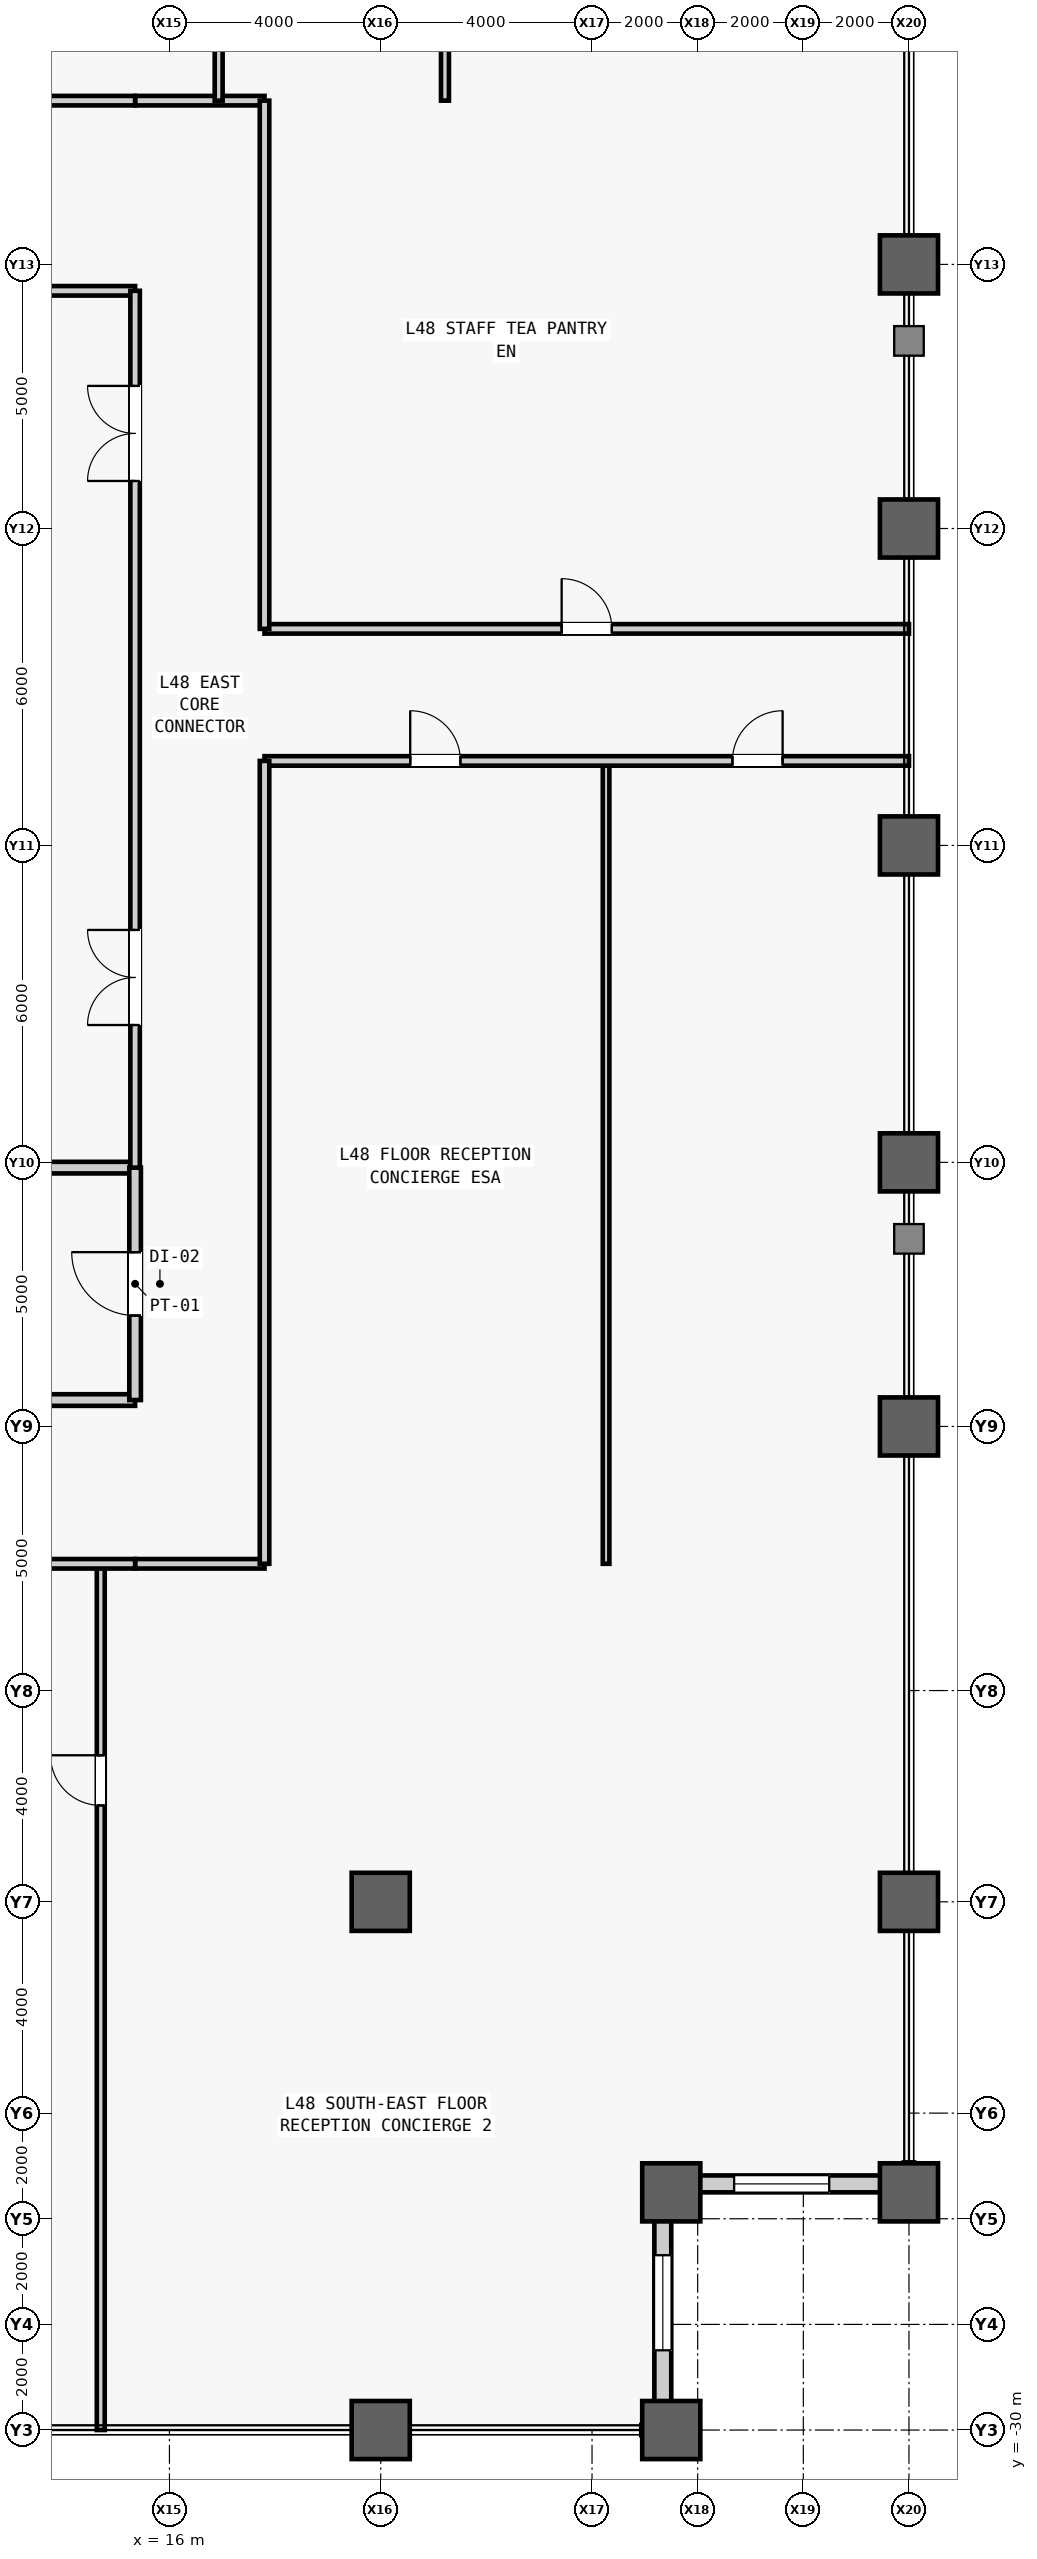
"""IFC4 building model, lengths in metres.
Left out: names, types, materials, properties, quantities, classifications, styles, units other than length and angle.
Written with IfcOpenShell. Run it as: python <this file> out.ifc"""

import sys

from ifc_helpers import new_model, si_unit, direction, frame, frame_2d, origin, origin_2d, place, context, subcontext, project, spatial, rectangle, hollow_rectangle, extrude, source, transform, mapped, element, fill, save


model = new_model("IFC4")
c1 = context("Model", 3, precision=1e-05, world=origin(), true_north=direction((0.0, 1.0)))
c2 = subcontext(c1, "Body", "Model", "MODEL_VIEW")
j1 = project(units=[si_unit("LENGTHUNIT", "METRE"), si_unit("PLANEANGLEUNIT", "RADIAN")], contexts=[c1])
p1 = place(None, origin())
s1 = spatial("IfcSite", under=j1, at=p1, CompositionType="ELEMENT")
p2 = place(p1, origin())
s2 = spatial("IfcBuilding", under=s1, at=p2, CompositionType="ELEMENT")
p3 = place(p2, frame((0.0, 0.0, 207.1)))
s3 = spatial("IfcBuildingStorey", under=s2, at=p3, CompositionType="ELEMENT", Elevation=207.1)
m1 = source(origin(), c2, "Body", "SweptSolid", [
    extrude(hollow_rectangle(XDim=1.1, YDim=1.1, WallThickness=0.06, at=origin_2d()), origin(), (0.0, 0.0, 1.0), 4.0),
])
for number, where, z_axis, x_axis in (
    (1, (20.0, -30.0, 0.0), (0.0, 0.0, 1.0), (1.0, 0.0, 0.0)),
    (2, (20.0, -20.0, 0.0), (0.0, 0.0, 1.0), (1.0, 0.0, 0.0)),
    (3, (25.5, -30.0, 0.0), (0.0, 0.0, 1.0), (1.0, 0.0, 0.0)),
    (4, (25.5, -25.5, 0.0), (0.0, 0.0, 1.0), (1.0, 0.0, 0.0)),
    (5, (30.0, -25.5, 0.0), (0.0, 0.0, 1.0), (1.0, 0.0, 0.0)),
    (6, (30.0, -20.0, 0.0), (0.0, 0.0, 1.0), (1.0, 0.0, 0.0)),
    (7, (30.0, -11.0, 0.0), (0.0, 0.0, 1.0), (1.0, 0.0, 0.0)),
    (8, (30.0, -6.0, 0.0), (0.0, 0.0, 1.0), (1.0, 0.0, 0.0)),
    (9, (30.0, 0.0, 0.0), (0.0, 0.0, 1.0), (1.0, 0.0, 0.0)),
    (10, (30.0, 6.0, 0.0), (0.0, 0.0, 1.0), (1.0, 0.0, 0.0)),
    (11, (30.0, 11.0, 0.0), (0.0, 0.0, 1.0), (1.0, 0.0, 0.0)),
):
    element("IfcColumn", number, at=place(p3, frame(where, z_axis=z_axis, x_axis=x_axis)), inside=s3, PredefinedType="COLUMN", context=c2, shape_type="MappedRepresentation", body=[
        mapped(m1, transform((0.0, 0.0, 0.0), scale=1.0)),
    ])
m2 = source(origin(), c2, "Body", "SweptSolid", [
    extrude(rectangle(XDim=4.18, YDim=0.32, at=frame_2d((2.09, 0.0))), origin(), (0.0, 0.0, 1.0), 2.38),
])
p4 = place(p3, frame((25.34, -29.68, 0.0), z_axis=(0.0, 0.0, 1.0), x_axis=(0.0, 1.0, 0.0)))
e12 = element("IfcWall", 12, at=p4, inside=s3, PredefinedType="STANDARD", context=c2, shape_type="MappedRepresentation", body=[
    mapped(m2, transform((0.0, 0.0, 0.0), scale=1.0)),
])
m3 = source(origin(), c2, "Body", "SweptSolid", [
    extrude(rectangle(XDim=1.8, YDim=1.66, at=frame_2d((0.9, 0.83))), frame((0.0, 0.17, 0.0), z_axis=(0.0, -1.0, 0.0), x_axis=(1.0, 0.0, 0.0)), (0.0, 0.0, 1.0), 0.34),
])
p5 = place(p4, frame((1.19, 0.0, 0.5)))
e13 = element("IfcOpeningElement", 13, at=p5, cuts=e12, PredefinedType="OPENING", context=c2, shape_type="MappedRepresentation", body=[
    mapped(m3, transform((0.0, 0.0, 0.0), scale=1.0)),
])
m4 = source(origin(), c2, "Body", "SweptSolid", [
    extrude(rectangle(XDim=4.18, YDim=0.32, at=frame_2d((2.09, 0.0))), origin(), (0.0, 0.0, 1.0), 3.164),
])
p6 = place(p3, frame((25.5, -25.34, 0.0), z_axis=(0.0, 0.0, 1.0), x_axis=(1.0, 0.0, 0.0)))
e14 = element("IfcWall", 14, at=p6, inside=s3, PredefinedType="STANDARD", context=c2, shape_type="MappedRepresentation", body=[
    mapped(m4, transform((0.0, 0.0, 0.0), scale=1.0)),
])
m5 = source(origin(), c2, "Body", "SweptSolid", [
    extrude(rectangle(XDim=1.8, YDim=2.4, at=frame_2d((0.9, 1.2))), frame((0.0, 0.17, 0.0), z_axis=(0.0, -1.0, 0.0), x_axis=(1.0, 0.0, 0.0)), (0.0, 0.0, 1.0), 0.34),
])
p7 = place(p6, frame((1.19, 0.0, 0.5)))
e15 = element("IfcOpeningElement", 15, at=p7, cuts=e14, PredefinedType="OPENING", context=c2, shape_type="MappedRepresentation", body=[
    mapped(m5, transform((0.0, 0.0, 0.0), scale=1.0)),
])
m6 = source(origin(), c2, "Body", "SweptSolid", [
    extrude(rectangle(XDim=4.05, YDim=0.22, at=frame_2d((2.025, 0.0))), origin(), (0.0, 0.0, 1.0), 3.78),
])
p8 = place(p3, frame((11.3, -10.5, 0.0), z_axis=(0.0, 0.0, 1.0), x_axis=(1.0, 0.0, 0.0)))
e16 = element("IfcWall", 16, at=p8, inside=s3, PredefinedType="PARTITIONING", context=c2, shape_type="MappedRepresentation", body=[
    mapped(m6, transform((0.0, 0.0, 0.0), scale=1.0)),
])
m7 = source(origin(), c2, "Body", "SweptSolid", [
    extrude(rectangle(XDim=4.05, YDim=0.22, at=frame_2d((2.025, 0.0))), origin(), (0.0, 0.0, 1.0), 2.38),
])
p9 = place(p3, frame((11.3, -6.1, 0.0), z_axis=(0.0, 0.0, 1.0), x_axis=(1.0, 0.0, 0.0)))
e17 = element("IfcWall", 17, at=p9, inside=s3, PredefinedType="PARTITIONING", context=c2, shape_type="MappedRepresentation", body=[
    mapped(m7, transform((0.0, 0.0, 0.0), scale=1.0)),
])
m8 = source(origin(), c2, "Body", "SweptSolid", [
    extrude(rectangle(XDim=4.4, YDim=0.22, at=frame_2d((2.2, 0.0))), origin(), (0.0, 0.0, 1.0), 3.78),
])
p10 = place(p3, frame((15.35, -10.5, 0.0), z_axis=(0.0, 0.0, 1.0), x_axis=(0.0, 1.0, 0.0)))
e18 = element("IfcWall", 18, at=p10, inside=s3, PredefinedType="PARTITIONING", context=c2, shape_type="MappedRepresentation", body=[
    mapped(m8, transform((0.0, 0.0, 0.0), scale=1.0)),
])
m9 = source(origin(), c2, "Body", "SweptSolid", [
    extrude(rectangle(XDim=1.2, YDim=2.2, at=frame_2d((0.6, 1.1))), frame((0.0, 0.12, 0.0), z_axis=(0.0, -1.0, 0.0), x_axis=(1.0, 0.0, 0.0)), (0.0, 0.0, 1.0), 0.24),
])
p11 = place(p10, frame((1.6, 0.0, 0.0)))
e19 = element("IfcOpeningElement", 19, at=p11, cuts=e18, PredefinedType="OPENING", context=c2, shape_type="MappedRepresentation", body=[
    mapped(m9, transform((0.0, 0.0, 0.0), scale=1.0)),
])
m10 = source(origin(), c2, "Body", "SweptSolid", [
    extrude(rectangle(XDim=4.05, YDim=0.18, at=frame_2d((2.025, 0.0))), origin(), (0.0, 0.0, 1.0), 3.78),
])
p12 = place(p3, frame((11.3, 10.5, 0.0), z_axis=(0.0, 0.0, 1.0), x_axis=(1.0, 0.0, 0.0)))
e20 = element("IfcWall", 20, at=p12, inside=s3, PredefinedType="PARTITIONING", context=c2, shape_type="MappedRepresentation", body=[
    mapped(m10, transform((0.0, 0.0, 0.0), scale=1.0)),
])
m11 = source(origin(), c2, "Body", "SweptSolid", [
    extrude(rectangle(XDim=16.6, YDim=0.18, at=frame_2d((8.3, 0.0))), origin(), (0.0, 0.0, 1.0), 3.78),
])
p13 = place(p3, frame((15.35, -6.1, 0.0), z_axis=(0.0, 0.0, 1.0), x_axis=(0.0, 1.0, 0.0)))
e21 = element("IfcWall", 21, at=p13, inside=s3, PredefinedType="PARTITIONING", context=c2, shape_type="MappedRepresentation", body=[
    mapped(m11, transform((0.0, 0.0, 0.0), scale=1.0)),
])
m12 = source(origin(), c2, "Body", "SweptSolid", [
    extrude(rectangle(XDim=1.8, YDim=2.25, at=frame_2d((0.9, 1.125))), frame((0.0, 0.1, 0.0), z_axis=(0.0, -1.0, 0.0), x_axis=(1.0, 0.0, 0.0)), (0.0, 0.0, 1.0), 0.2),
])
p14 = place(p13, frame((2.7, 0.0, 0.0)))
e22 = element("IfcOpeningElement", 22, at=p14, cuts=e21, PredefinedType="OPENING", context=c2, shape_type="MappedRepresentation", body=[
    mapped(m12, transform((0.0, 0.0, 0.0), scale=1.0)),
])
p15 = place(p13, frame((13.0, 0.0, 0.0)))
e23 = element("IfcOpeningElement", 23, at=p15, cuts=e21, PredefinedType="OPENING", context=c2, shape_type="MappedRepresentation", body=[
    mapped(m12, transform((0.0, 0.0, 0.0), scale=1.0)),
])
m13 = source(origin(), c2, "Body", "SweptSolid", [
    extrude(rectangle(XDim=2.45, YDim=0.18, at=frame_2d((1.225, 0.0))), origin(), (0.0, 0.0, 1.0), 3.78),
])
for number, where, z_axis, x_axis in (
    (24, (15.35, -13.6, 0.0), (0.0, 0.0, 1.0), (1.0, 0.0, 0.0)),
    (25, (15.35, 14.1, 0.0), (0.0, 0.0, 1.0), (1.0, 0.0, 0.0)),
):
    element("IfcWall", number, at=place(p3, frame(where, z_axis=z_axis, x_axis=x_axis)), inside=s3, PredefinedType="PARTITIONING", context=c2, shape_type="MappedRepresentation", body=[
        mapped(m13, transform((0.0, 0.0, 0.0), scale=1.0)),
    ])
m14 = source(origin(), c2, "Body", "SweptSolid", [
    extrude(rectangle(XDim=16.4, YDim=0.15, at=frame_2d((8.2, 0.0))), origin(), (0.0, 0.0, 1.0), 3.78),
])
p16 = place(p3, frame((14.7, -30.0, 0.0), z_axis=(0.0, 0.0, 1.0), x_axis=(0.0, 1.0, 0.0)))
e26 = element("IfcWall", 26, at=p16, inside=s3, PredefinedType="PARTITIONING", context=c2, shape_type="MappedRepresentation", body=[
    mapped(m14, transform((0.0, 0.0, 0.0), scale=1.0)),
])
m15 = source(origin(), c2, "Body", "SweptSolid", [
    extrude(rectangle(XDim=0.95, YDim=2.15, at=frame_2d((0.475, 1.075))), frame((0.0, 0.085, 0.0), z_axis=(0.0, -1.0, 0.0), x_axis=(1.0, 0.0, 0.0)), (0.0, 0.0, 1.0), 0.17),
])
p17 = place(p16, frame((11.825, 0.0, 0.0)))
e27 = element("IfcOpeningElement", 27, at=p17, cuts=e26, PredefinedType="OPENING", context=c2, shape_type="MappedRepresentation", body=[
    mapped(m15, transform((0.0, 0.0, 0.0), scale=1.0)),
])
m16 = source(origin(), c2, "Body", "SweptSolid", [
    extrude(rectangle(XDim=11.45, YDim=0.18, at=frame_2d((5.725, 0.0))), origin(), (0.0, 0.0, 1.0), 3.78),
])
p18 = place(p3, frame((3.9, -13.6, 0.0), z_axis=(0.0, 0.0, 1.0), x_axis=(1.0, 0.0, 0.0)))
e28 = element("IfcWall", 28, at=p18, inside=s3, PredefinedType="PARTITIONING", context=c2, shape_type="MappedRepresentation", body=[
    mapped(m16, transform((0.0, 0.0, 0.0), scale=1.0)),
])
m17 = source(origin(), c2, "Body", "SweptSolid", [
    extrude(rectangle(XDim=15.9, YDim=0.15, at=frame_2d((7.95, 0.0))), origin(), (0.0, 0.0, 1.0), 3.78),
])
p19 = place(p3, frame((16.932, 14.1, 0.0), z_axis=(0.0, 0.0, 1.0), x_axis=(0.0, 1.0, 0.0)))
e29 = element("IfcWall", 29, at=p19, inside=s3, PredefinedType="PARTITIONING", context=c2, shape_type="MappedRepresentation", body=[
    mapped(m17, transform((0.0, 0.0, 0.0), scale=1.0)),
])
p20 = place(p19, frame((11.45, 0.0, 0.0)))
e30 = element("IfcOpeningElement", 30, at=p20, cuts=e29, PredefinedType="OPENING", context=c2, shape_type="MappedRepresentation", body=[
    mapped(m15, transform((0.0, 0.0, 0.0), scale=1.0)),
])
p21 = place(p3, frame((21.216, 14.1, 0.0), z_axis=(0.0, 0.0, 1.0), x_axis=(0.0, 1.0, 0.0)))
e31 = element("IfcWall", 31, at=p21, inside=s3, PredefinedType="PARTITIONING", context=c2, shape_type="MappedRepresentation", body=[
    mapped(m17, transform((0.0, 0.0, 0.0), scale=1.0)),
])
p22 = place(p21, frame((11.45, 0.0, 0.0)))
e32 = element("IfcOpeningElement", 32, at=p22, cuts=e31, PredefinedType="OPENING", context=c2, shape_type="MappedRepresentation", body=[
    mapped(m15, transform((0.0, 0.0, 0.0), scale=1.0)),
])
m18 = source(origin(), c2, "Body", "SweptSolid", [
    extrude(rectangle(XDim=2.45, YDim=0.18, at=frame_2d((1.225, 0.0))), origin(), (0.0, 0.0, 1.0), 3.78),
])
p23 = place(p3, frame((12.9, 14.1, 0.0), z_axis=(0.0, 0.0, 1.0), x_axis=(1.0, 0.0, 0.0)))
e33 = element("IfcWall", 33, at=p23, inside=s3, PredefinedType="PARTITIONING", context=c2, shape_type="MappedRepresentation", body=[
    mapped(m18, transform((0.0, 0.0, 0.0), scale=1.0)),
])
m19 = source(origin(), c2, "Body", "SweptSolid", [
    extrude(rectangle(XDim=15.2, YDim=0.125, at=frame_2d((7.6, 0.0))), origin(), (0.0, 0.0, 1.0), 3.78),
])
p24 = place(p3, frame((24.266, -13.6, 0.0), z_axis=(0.0, 0.0, 1.0), x_axis=(0.0, 1.0, 0.0)))
e34 = element("IfcWall", 34, at=p24, inside=s3, PredefinedType="PARTITIONING", context=c2, shape_type="MappedRepresentation", body=[
    mapped(m19, transform((0.0, 0.0, 0.0), scale=1.0)),
])
m20 = source(origin(), c2, "Body", "SweptSolid", [
    extrude(rectangle(XDim=12.2, YDim=0.18, at=frame_2d((6.1, 0.0))), origin(), (0.0, 0.0, 1.0), 3.78),
])
p25 = place(p3, frame((17.8, 1.6, 0.0), z_axis=(0.0, 0.0, 1.0), x_axis=(1.0, 0.0, 0.0)))
e35 = element("IfcWall", 35, at=p25, inside=s3, PredefinedType="PARTITIONING", context=c2, shape_type="MappedRepresentation", body=[
    mapped(m20, transform((0.0, 0.0, 0.0), scale=1.0)),
])
m21 = source(origin(), c2, "Body", "SweptSolid", [
    extrude(rectangle(XDim=0.95, YDim=2.15, at=frame_2d((0.475, 1.075))), frame((0.0, 0.1, 0.0), z_axis=(0.0, -1.0, 0.0), x_axis=(1.0, 0.0, 0.0)), (0.0, 0.0, 1.0), 0.2),
])
p26 = place(p25, frame((2.758, 0.0, 0.0)))
e36 = element("IfcOpeningElement", 36, at=p26, cuts=e35, PredefinedType="OPENING", context=c2, shape_type="MappedRepresentation", body=[
    mapped(m21, transform((0.0, 0.0, 0.0), scale=1.0)),
])
p27 = place(p25, frame((8.858, 0.0, 0.0)))
e37 = element("IfcOpeningElement", 37, at=p27, cuts=e35, PredefinedType="OPENING", context=c2, shape_type="MappedRepresentation", body=[
    mapped(m21, transform((0.0, 0.0, 0.0), scale=1.0)),
])
m22 = source(origin(), c2, "Body", "SweptSolid", [
    extrude(rectangle(XDim=15.2, YDim=0.18, at=frame_2d((7.6, 0.0))), origin(), (0.0, 0.0, 1.0), 3.78),
])
p28 = place(p3, frame((17.8, -13.6, 0.0), z_axis=(0.0, 0.0, 1.0), x_axis=(0.0, 1.0, 0.0)))
e38 = element("IfcWall", 38, at=p28, inside=s3, PredefinedType="PARTITIONING", context=c2, shape_type="MappedRepresentation", body=[
    mapped(m22, transform((0.0, 0.0, 0.0), scale=1.0)),
])
p29 = place(p3, frame((17.8, 4.1, 0.0), z_axis=(0.0, 0.0, 1.0), x_axis=(1.0, 0.0, 0.0)))
e39 = element("IfcWall", 39, at=p29, inside=s3, PredefinedType="PARTITIONING", context=c2, shape_type="MappedRepresentation", body=[
    mapped(m20, transform((0.0, 0.0, 0.0), scale=1.0)),
])
p30 = place(p29, frame((5.625, 0.0, 0.0)))
e40 = element("IfcOpeningElement", 40, at=p30, cuts=e39, PredefinedType="OPENING", context=c2, shape_type="MappedRepresentation", body=[
    mapped(m21, transform((0.0, 0.0, 0.0), scale=1.0)),
])
m23 = source(origin(), c2, "Body", "SweptSolid", [
    extrude(rectangle(XDim=10.0, YDim=0.18, at=frame_2d((5.0, 0.0))), origin(), (0.0, 0.0, 1.0), 3.78),
])
p31 = place(p3, frame((17.8, 4.1, 0.0), z_axis=(0.0, 0.0, 1.0), x_axis=(0.0, 1.0, 0.0)))
e41 = element("IfcWall", 41, at=p31, inside=s3, PredefinedType="PARTITIONING", context=c2, shape_type="MappedRepresentation", body=[
    mapped(m23, transform((0.0, 0.0, 0.0), scale=1.0)),
])
m24 = source(origin(), c2, "Body", "SweptSolid", [
    extrude(rectangle(XDim=1.8, YDim=1.66, at=frame_2d((0.9, 0.83))), frame((0.0, 0.03, 0.0), z_axis=(0.0, -1.0, 0.0), x_axis=(1.0, 0.0, 0.0)), (0.0, 0.0, 1.0), 0.06),
])
p32 = place(p5, origin())
e42 = element("IfcWindow", 42, at=p32, inside=s3, PartitioningType="SINGLE_PANEL", PredefinedType="WINDOW", context=c2, shape_type="MappedRepresentation", body=[
    mapped(m24, transform((0.0, 0.0, 0.0), scale=1.0)),
])
fill(e13, e42)
m25 = source(origin(), c2, "Body", "SweptSolid", [
    extrude(rectangle(XDim=1.8, YDim=2.4, at=frame_2d((0.9, 1.2))), frame((0.0, 0.03, 0.0), z_axis=(0.0, -1.0, 0.0), x_axis=(1.0, 0.0, 0.0)), (0.0, 0.0, 1.0), 0.06),
])
p33 = place(p7, origin())
e43 = element("IfcWindow", 43, at=p33, inside=s3, PartitioningType="SINGLE_PANEL", PredefinedType="WINDOW", context=c2, shape_type="MappedRepresentation", body=[
    mapped(m25, transform((0.0, 0.0, 0.0), scale=1.0)),
])
fill(e15, e43)
m26 = source(origin(), c2, "Body", "SweptSolid", [
    extrude(rectangle(XDim=1.2, YDim=2.2, at=frame_2d((0.6, 1.1))), frame((0.0, 0.025, 0.0), z_axis=(0.0, -1.0, 0.0), x_axis=(1.0, 0.0, 0.0)), (0.0, 0.0, 1.0), 0.05),
])
p34 = place(p11, origin())
e44 = element("IfcDoor", 44, at=p34, inside=s3, OperationType="SINGLE_SWING_RIGHT", PredefinedType="DOOR", context=c2, shape_type="MappedRepresentation", body=[
    mapped(m26, transform((0.0, 0.0, 0.0), scale=1.0)),
])
fill(e19, e44)
m27 = source(origin(), c2, "Body", "SweptSolid", [
    extrude(rectangle(XDim=1.8, YDim=2.25, at=frame_2d((0.9, 1.125))), frame((0.0, 0.025, 0.0), z_axis=(0.0, -1.0, 0.0), x_axis=(1.0, 0.0, 0.0)), (0.0, 0.0, 1.0), 0.05),
])
p35 = place(p14, origin())
e45 = element("IfcDoor", 45, at=p35, inside=s3, OperationType="SINGLE_SWING_RIGHT", PredefinedType="DOOR", context=c2, shape_type="MappedRepresentation", body=[
    mapped(m27, transform((0.0, 0.0, 0.0), scale=1.0)),
])
fill(e22, e45)
p36 = place(p15, origin())
e46 = element("IfcDoor", 46, at=p36, inside=s3, OperationType="SINGLE_SWING_LEFT", PredefinedType="DOOR", context=c2, shape_type="MappedRepresentation", body=[
    mapped(m27, transform((0.0, 0.0, 0.0), scale=1.0)),
])
fill(e23, e46)
m28 = source(origin(), c2, "Body", "SweptSolid", [
    extrude(rectangle(XDim=0.95, YDim=2.15, at=frame_2d((0.475, 1.075))), frame((0.0, 0.025, 0.0), z_axis=(0.0, -1.0, 0.0), x_axis=(1.0, 0.0, 0.0)), (0.0, 0.0, 1.0), 0.05),
])
p37 = place(p17, origin())
e47 = element("IfcDoor", 47, at=p37, inside=s3, OperationType="SINGLE_SWING_RIGHT", PredefinedType="DOOR", context=c2, shape_type="MappedRepresentation", body=[
    mapped(m28, transform((0.0, 0.0, 0.0), scale=1.0)),
])
fill(e27, e47)
p38 = place(p26, origin())
e48 = element("IfcDoor", 48, at=p38, inside=s3, OperationType="SINGLE_SWING_LEFT", PredefinedType="DOOR", context=c2, shape_type="MappedRepresentation", body=[
    mapped(m28, transform((0.0, 0.0, 0.0), scale=1.0)),
])
fill(e36, e48)
p39 = place(p27, origin())
e49 = element("IfcDoor", 49, at=p39, inside=s3, OperationType="SINGLE_SWING_RIGHT", PredefinedType="DOOR", context=c2, shape_type="MappedRepresentation", body=[
    mapped(m28, transform((0.0, 0.0, 0.0), scale=1.0)),
])
fill(e37, e49)
p40 = place(p30, origin())
e50 = element("IfcDoor", 50, at=p40, inside=s3, OperationType="SINGLE_SWING_LEFT", PredefinedType="DOOR", context=c2, shape_type="MappedRepresentation", body=[
    mapped(m28, transform((0.0, 0.0, 0.0), scale=1.0)),
])
fill(e40, e50)
save(model, sys.argv[1])
